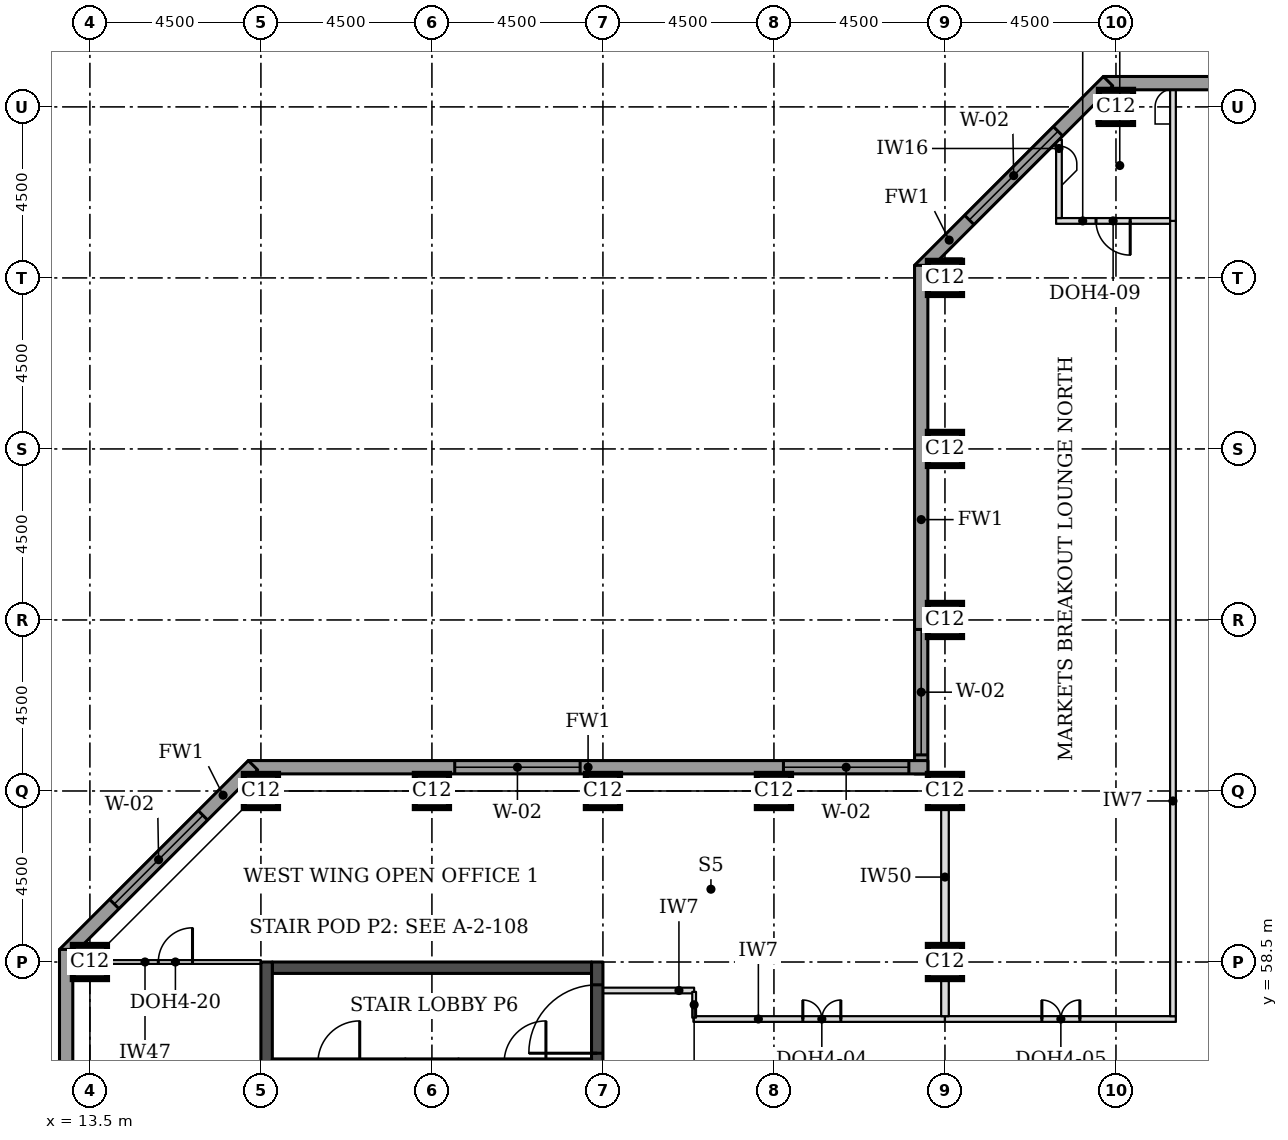
"""IFC4 building model, lengths in metres.
Left out: names, types, materials, properties, quantities, classifications, styles, units other than length and angle.
Written with IfcOpenShell. Run it as: python <this file> out.ifc"""

import sys

from ifc_helpers import new_model, si_unit, direction, frame, frame_2d, origin, origin_2d, place, context, subcontext, project, spatial, rectangle, extrude, element, fill, save


model = new_model("IFC4")
c1 = context("Model", 3, precision=1e-05, world=origin(), true_north=direction((0.0, 1.0)))
c2 = subcontext(c1, "Body", "Model", "MODEL_VIEW")
j1 = project(units=[si_unit("LENGTHUNIT", "METRE"), si_unit("PLANEANGLEUNIT", "RADIAN")], contexts=[c1])
p1 = place(None, origin())
s1 = spatial("IfcSite", under=j1, at=p1, CompositionType="ELEMENT")
p2 = place(p1, origin())
s2 = spatial("IfcBuilding", under=s1, at=p2, CompositionType="ELEMENT")
p3 = place(p2, frame((0.0, 0.0, 169.9)))
s3 = spatial("IfcBuildingStorey", under=s2, at=p3, CompositionType="ELEMENT", Elevation=169.9)
for number, where, z_axis, x_axis in (
    (1, (13.5, 58.5, 0.0), (0.0, 0.0, 1.0), (1.0, 0.0, 0.0)),
    (2, (36.0, 58.5, 0.0), (0.0, 0.0, 1.0), (1.0, 0.0, 0.0)),
    (3, (18.0, 63.0, 0.0), (0.0, 0.0, 1.0), (1.0, 0.0, 0.0)),
    (4, (22.5, 63.0, 0.0), (0.0, 0.0, 1.0), (1.0, 0.0, 0.0)),
    (5, (27.0, 63.0, 0.0), (0.0, 0.0, 1.0), (1.0, 0.0, 0.0)),
    (6, (31.5, 63.0, 0.0), (0.0, 0.0, 1.0), (1.0, 0.0, 0.0)),
    (7, (36.0, 63.0, 0.0), (0.0, 0.0, 1.0), (1.0, 0.0, 0.0)),
    (8, (36.0, 67.5, 0.0), (0.0, 0.0, 1.0), (1.0, 0.0, 0.0)),
    (9, (36.0, 72.0, 0.0), (0.0, 0.0, 1.0), (1.0, 0.0, 0.0)),
    (10, (36.0, 76.5, 0.0), (0.0, 0.0, 1.0), (1.0, 0.0, 0.0)),
    (11, (40.5, 81.0, 0.0), (0.0, 0.0, 1.0), (1.0, 0.0, 0.0)),
):
    element("IfcColumn", number, at=place(p3, frame(where, z_axis=z_axis, x_axis=x_axis)), inside=s3, PredefinedType="COLUMN", context=c2, shape_type="SweptSolid", body=[
        extrude(rectangle(XDim=0.9, YDim=0.9, at=origin_2d()), origin(), (0.0, 0.0, 1.0), 3.7),
    ])
p4 = place(p3, frame((18.3, 58.35, 0.0), z_axis=(0.0, 0.0, 1.0), x_axis=(1.0, 0.0, 0.0)))
e12 = element("IfcWall", 12, at=p4, inside=s3, PredefinedType="SHEAR", context=c2, shape_type="SweptSolid", body=[
    extrude(rectangle(XDim=8.4, YDim=0.3, at=frame_2d((4.2, 0.0))), origin(), (0.0, 0.0, 1.0), 3.7),
])
p5 = place(p3, frame((18.15, 49.5, 0.0), z_axis=(0.0, 0.0, 1.0), x_axis=(0.0, 1.0, 0.0)))
e13 = element("IfcWall", 13, at=p5, inside=s3, PredefinedType="SHEAR", context=c2, shape_type="SweptSolid", body=[
    extrude(rectangle(XDim=9.0, YDim=0.3, at=frame_2d((4.5, 0.0))), origin(), (0.0, 0.0, 1.0), 3.7),
])
p6 = place(p3, frame((26.85, 49.5, 0.0), z_axis=(0.0, 0.0, 1.0), x_axis=(0.0, 1.0, 0.0)))
e14 = element("IfcWall", 14, at=p6, inside=s3, PredefinedType="SHEAR", context=c2, shape_type="SweptSolid", body=[
    extrude(rectangle(XDim=9.0, YDim=0.3, at=frame_2d((4.5, 0.0))), origin(), (0.0, 0.0, 1.0), 3.7),
])
p7 = place(p6, frame((6.6, 0.0, 0.0)))
e15 = element("IfcOpeningElement", 15, at=p7, cuts=e14, PredefinedType="OPENING", context=c2, shape_type="SweptSolid", body=[
    extrude(rectangle(XDim=1.8, YDim=2.1, at=frame_2d((0.9, 1.05))), frame((0.0, 0.16, 0.0), z_axis=(0.0, -1.0, 0.0), x_axis=(1.0, 0.0, 0.0)), (0.0, 0.0, 1.0), 0.32),
])
p8 = place(p3, frame((72.331, 81.625, 0.0), z_axis=(0.0, 0.0, 1.0), x_axis=(-1.0, 0.0, 0.0)))
e16 = element("IfcWall", 16, at=p8, inside=s3, PredefinedType="STANDARD", context=c2, shape_type="SweptSolid", body=[
    extrude(rectangle(XDim=32.163, YDim=0.35, at=frame_2d((16.081, 0.0))), origin(), (0.0, 0.0, 1.0), 3.525),
])
p9 = place(p8, frame((5.431, 0.0, 0.9)))
e17 = element("IfcOpeningElement", 17, at=p9, cuts=e16, PredefinedType="OPENING", context=c2, shape_type="SweptSolid", body=[
    extrude(rectangle(XDim=3.3, YDim=1.9, at=frame_2d((1.65, 0.95))), frame((0.0, 0.185, 0.0), z_axis=(0.0, -1.0, 0.0), x_axis=(1.0, 0.0, 0.0)), (0.0, 0.0, 1.0), 0.37),
])
p10 = place(p8, frame((9.931, 0.0, 0.9)))
e18 = element("IfcOpeningElement", 18, at=p10, cuts=e16, PredefinedType="OPENING", context=c2, shape_type="SweptSolid", body=[
    extrude(rectangle(XDim=3.3, YDim=1.9, at=frame_2d((1.65, 0.95))), frame((0.0, 0.185, 0.0), z_axis=(0.0, -1.0, 0.0), x_axis=(1.0, 0.0, 0.0)), (0.0, 0.0, 1.0), 0.37),
])
p11 = place(p8, frame((14.431, 0.0, 0.9)))
e19 = element("IfcOpeningElement", 19, at=p11, cuts=e16, PredefinedType="OPENING", context=c2, shape_type="SweptSolid", body=[
    extrude(rectangle(XDim=3.3, YDim=1.9, at=frame_2d((1.65, 0.95))), frame((0.0, 0.185, 0.0), z_axis=(0.0, -1.0, 0.0), x_axis=(1.0, 0.0, 0.0)), (0.0, 0.0, 1.0), 0.37),
])
p12 = place(p8, frame((18.931, 0.0, 0.9)))
e20 = element("IfcOpeningElement", 20, at=p12, cuts=e16, PredefinedType="OPENING", context=c2, shape_type="SweptSolid", body=[
    extrude(rectangle(XDim=3.3, YDim=1.9, at=frame_2d((1.65, 0.95))), frame((0.0, 0.185, 0.0), z_axis=(0.0, -1.0, 0.0), x_axis=(1.0, 0.0, 0.0)), (0.0, 0.0, 1.0), 0.37),
])
p13 = place(p8, frame((23.431, 0.0, 0.9)))
e21 = element("IfcOpeningElement", 21, at=p13, cuts=e16, PredefinedType="OPENING", context=c2, shape_type="SweptSolid", body=[
    extrude(rectangle(XDim=3.3, YDim=1.9, at=frame_2d((1.65, 0.95))), frame((0.0, 0.185, 0.0), z_axis=(0.0, -1.0, 0.0), x_axis=(1.0, 0.0, 0.0)), (0.0, 0.0, 1.0), 0.37),
])
p14 = place(p3, frame((40.292, 81.676, 0.0), z_axis=(0.0, 0.0, 1.0), x_axis=(-0.707106781187, -0.707106781187, 0.0)))
e22 = element("IfcWall", 22, at=p14, inside=s3, PredefinedType="STANDARD", context=c2, shape_type="SweptSolid", body=[
    extrude(rectangle(XDim=7.027, YDim=0.35, at=frame_2d((3.513, 0.0))), origin(), (0.0, 0.0, 1.0), 3.525),
])
p15 = place(p14, frame((1.863, 0.0, 0.9)))
e23 = element("IfcOpeningElement", 23, at=p15, cuts=e22, PredefinedType="OPENING", context=c2, shape_type="SweptSolid", body=[
    extrude(rectangle(XDim=3.3, YDim=1.9, at=frame_2d((1.65, 0.95))), frame((0.0, 0.185, 0.0), z_axis=(0.0, -1.0, 0.0), x_axis=(1.0, 0.0, 0.0)), (0.0, 0.0, 1.0), 0.37),
])
p16 = place(p3, frame((35.375, 76.831, 0.0), z_axis=(0.0, 0.0, 1.0), x_axis=(0.0, -1.0, 0.0)))
e24 = element("IfcWall", 24, at=p16, inside=s3, PredefinedType="STANDARD", context=c2, shape_type="SweptSolid", body=[
    extrude(rectangle(XDim=13.381, YDim=0.35, at=frame_2d((6.691, 0.0))), origin(), (0.0, 0.0, 1.0), 3.525),
])
p17 = place(p16, frame((9.581, 0.0, 0.9)))
e25 = element("IfcOpeningElement", 25, at=p17, cuts=e24, PredefinedType="OPENING", context=c2, shape_type="SweptSolid", body=[
    extrude(rectangle(XDim=3.3, YDim=1.9, at=frame_2d((1.65, 0.95))), frame((0.0, 0.185, 0.0), z_axis=(0.0, -1.0, 0.0), x_axis=(1.0, 0.0, 0.0)), (0.0, 0.0, 1.0), 0.37),
])
p18 = place(p3, frame((35.55, 63.625, 0.0), z_axis=(0.0, 0.0, 1.0), x_axis=(-1.0, 0.0, 0.0)))
e26 = element("IfcWall", 26, at=p18, inside=s3, PredefinedType="STANDARD", context=c2, shape_type="SweptSolid", body=[
    extrude(rectangle(XDim=17.881, YDim=0.35, at=frame_2d((8.941, 0.0))), origin(), (0.0, 0.0, 1.0), 3.525),
])
p19 = place(p18, frame((0.5, 0.0, 0.9)))
e27 = element("IfcOpeningElement", 27, at=p19, cuts=e26, PredefinedType="OPENING", context=c2, shape_type="SweptSolid", body=[
    extrude(rectangle(XDim=3.3, YDim=1.9, at=frame_2d((1.65, 0.95))), frame((0.0, 0.185, 0.0), z_axis=(0.0, -1.0, 0.0), x_axis=(1.0, 0.0, 0.0)), (0.0, 0.0, 1.0), 0.37),
])
p20 = place(p18, frame((9.15, 0.0, 0.9)))
e28 = element("IfcOpeningElement", 28, at=p20, cuts=e26, PredefinedType="OPENING", context=c2, shape_type="SweptSolid", body=[
    extrude(rectangle(XDim=3.3, YDim=1.9, at=frame_2d((1.65, 0.95))), frame((0.0, 0.185, 0.0), z_axis=(0.0, -1.0, 0.0), x_axis=(1.0, 0.0, 0.0)), (0.0, 0.0, 1.0), 0.37),
])
p21 = place(p3, frame((17.792, 63.676, 0.0), z_axis=(0.0, 0.0, 1.0), x_axis=(-0.707106781187, -0.707106781187, 0.0)))
e29 = element("IfcWall", 29, at=p21, inside=s3, PredefinedType="STANDARD", context=c2, shape_type="SweptSolid", body=[
    extrude(rectangle(XDim=7.027, YDim=0.35, at=frame_2d((3.513, 0.0))), origin(), (0.0, 0.0, 1.0), 3.525),
])
p22 = place(p21, frame((1.863, 0.0, 0.9)))
e30 = element("IfcOpeningElement", 30, at=p22, cuts=e29, PredefinedType="OPENING", context=c2, shape_type="SweptSolid", body=[
    extrude(rectangle(XDim=3.3, YDim=1.9, at=frame_2d((1.65, 0.95))), frame((0.0, 0.185, 0.0), z_axis=(0.0, -1.0, 0.0), x_axis=(1.0, 0.0, 0.0)), (0.0, 0.0, 1.0), 0.37),
])
p23 = place(p3, frame((12.875, 58.831, 0.0), z_axis=(0.0, 0.0, 1.0), x_axis=(0.0, -1.0, 0.0)))
e31 = element("IfcWall", 31, at=p23, inside=s3, PredefinedType="STANDARD", context=c2, shape_type="SweptSolid", body=[
    extrude(rectangle(XDim=14.163, YDim=0.35, at=frame_2d((7.081, 0.0))), origin(), (0.0, 0.0, 1.0), 3.525),
])
p24 = place(p23, frame((5.431, 0.0, 0.9)))
e32 = element("IfcOpeningElement", 32, at=p24, cuts=e31, PredefinedType="OPENING", context=c2, shape_type="SweptSolid", body=[
    extrude(rectangle(XDim=3.3, YDim=1.9, at=frame_2d((1.65, 0.95))), frame((0.0, 0.185, 0.0), z_axis=(0.0, -1.0, 0.0), x_axis=(1.0, 0.0, 0.0)), (0.0, 0.0, 1.0), 0.37),
])
p25 = place(p3, frame((29.38, 57.0, 0.0), z_axis=(0.0, 0.0, 1.0), x_axis=(1.0, 0.0, 0.0)))
e33 = element("IfcWall", 33, at=p25, inside=s3, PredefinedType="PARTITIONING", context=c2, shape_type="SweptSolid", body=[
    extrude(rectangle(XDim=6.62, YDim=0.15, at=frame_2d((3.31, 0.0))), origin(), (0.0, 0.0, 1.0), 3.55),
])
p26 = place(p25, frame((2.88, 0.0, 0.0)))
e34 = element("IfcOpeningElement", 34, at=p26, cuts=e33, PredefinedType="OPENING", context=c2, shape_type="SweptSolid", body=[
    extrude(rectangle(XDim=1.0, YDim=2.1, at=frame_2d((0.5, 1.05))), frame((0.0, 0.085, 0.0), z_axis=(0.0, -1.0, 0.0), x_axis=(1.0, 0.0, 0.0)), (0.0, 0.0, 1.0), 0.17),
])
p27 = place(p3, frame((36.0, 57.0, 0.0), z_axis=(0.0, 0.0, 1.0), x_axis=(1.0, 0.0, 0.0)))
e35 = element("IfcWall", 35, at=p27, inside=s3, PredefinedType="PARTITIONING", context=c2, shape_type="SweptSolid", body=[
    extrude(rectangle(XDim=6.075, YDim=0.15, at=frame_2d((3.038, 0.0))), origin(), (0.0, 0.0, 1.0), 3.55),
])
p28 = place(p27, frame((2.55, 0.0, 0.0)))
e36 = element("IfcOpeningElement", 36, at=p28, cuts=e35, PredefinedType="OPENING", context=c2, shape_type="SweptSolid", body=[
    extrude(rectangle(XDim=1.0, YDim=2.1, at=frame_2d((0.5, 1.05))), frame((0.0, 0.085, 0.0), z_axis=(0.0, -1.0, 0.0), x_axis=(1.0, 0.0, 0.0)), (0.0, 0.0, 1.0), 0.17),
])
p29 = place(p3, frame((38.925, 78.0, 0.0), z_axis=(0.0, 0.0, 1.0), x_axis=(1.0, 0.0, 0.0)))
e37 = element("IfcWall", 37, at=p29, inside=s3, PredefinedType="PARTITIONING", context=c2, shape_type="SweptSolid", body=[
    extrude(rectangle(XDim=3.0, YDim=0.15, at=frame_2d((1.5, 0.0))), origin(), (0.0, 0.0, 1.0), 3.55),
])
p30 = place(p29, frame((1.05, 0.0, 0.0)))
e38 = element("IfcOpeningElement", 38, at=p30, cuts=e37, PredefinedType="OPENING", context=c2, shape_type="SweptSolid", body=[
    extrude(rectangle(XDim=0.9, YDim=2.1, at=frame_2d((0.45, 1.05))), frame((0.0, 0.085, 0.0), z_axis=(0.0, -1.0, 0.0), x_axis=(1.0, 0.0, 0.0)), (0.0, 0.0, 1.0), 0.17),
])
p31 = place(p3, frame((36.0, 57.075, 0.0), z_axis=(0.0, 0.0, 1.0), x_axis=(0.0, 1.0, 0.0)))
e39 = element("IfcWall", 39, at=p31, inside=s3, PredefinedType="PARTITIONING", context=c2, shape_type="SweptSolid", body=[
    extrude(rectangle(XDim=0.975, YDim=0.2, at=frame_2d((0.488, 0.0))), origin(), (0.0, 0.0, 1.0), 2.8),
])
p32 = place(p3, frame((42.0, 57.075, 0.0), z_axis=(0.0, 0.0, 1.0), x_axis=(0.0, 1.0, 0.0)))
e40 = element("IfcWall", 40, at=p32, inside=s3, PredefinedType="PARTITIONING", context=c2, shape_type="SweptSolid", body=[
    extrude(rectangle(XDim=20.925, YDim=0.15, at=frame_2d((10.462, 0.0))), origin(), (0.0, 0.0, 1.0), 3.55),
])
p33 = place(p3, frame((36.0, 58.92, 0.0), z_axis=(0.0, 0.0, 1.0), x_axis=(0.0, 1.0, 0.0)))
e41 = element("IfcWall", 41, at=p33, inside=s3, PredefinedType="PARTITIONING", context=c2, shape_type="SweptSolid", body=[
    extrude(rectangle(XDim=3.63, YDim=0.2, at=frame_2d((1.815, 0.0))), origin(), (0.0, 0.0, 1.0), 2.8),
])
p34 = place(p3, frame((42.0, 78.0, 0.0), z_axis=(0.0, 0.0, 1.0), x_axis=(0.0, 1.0, 0.0)))
e42 = element("IfcWall", 42, at=p34, inside=s3, PredefinedType="PARTITIONING", context=c2, shape_type="SweptSolid", body=[
    extrude(rectangle(XDim=3.45, YDim=0.15, at=frame_2d((1.725, 0.0))), origin(), (0.0, 0.0, 1.0), 3.55),
])
p35 = place(p3, frame((39.0, 78.075, 0.0), z_axis=(0.0, 0.0, 1.0), x_axis=(0.0, 1.0, 0.0)))
e43 = element("IfcWall", 43, at=p35, inside=s3, PredefinedType="PARTITIONING", context=c2, shape_type="SweptSolid", body=[
    extrude(rectangle(XDim=2.062, YDim=0.15, at=frame_2d((1.031, 0.0))), origin(), (0.0, 0.0, 1.0), 3.55),
])
p36 = place(p3, frame((13.5, 58.5, 0.0), z_axis=(0.0, 0.0, 1.0), x_axis=(1.0, 0.0, 0.0)))
e44 = element("IfcWall", 44, at=p36, inside=s3, PredefinedType="PARTITIONING", context=c2, shape_type="SweptSolid", body=[
    extrude(rectangle(XDim=4.5, YDim=0.1, at=frame_2d((2.25, 0.0))), origin(), (0.0, 0.0, 1.0), 2.55),
])
p37 = place(p36, frame((1.8, 0.0, 0.0)))
e45 = element("IfcOpeningElement", 45, at=p37, cuts=e44, PredefinedType="OPENING", context=c2, shape_type="SweptSolid", body=[
    extrude(rectangle(XDim=0.9, YDim=2.1, at=frame_2d((0.45, 1.05))), frame((0.0, 0.06, 0.0), z_axis=(0.0, -1.0, 0.0), x_axis=(1.0, 0.0, 0.0)), (0.0, 0.0, 1.0), 0.12),
])
p38 = place(p3, frame((27.0, 57.75, 0.0), z_axis=(0.0, 0.0, 1.0), x_axis=(1.0, 0.0, 0.0)))
e46 = element("IfcWall", 46, at=p38, inside=s3, PredefinedType="PARTITIONING", context=c2, shape_type="SweptSolid", body=[
    extrude(rectangle(XDim=2.4, YDim=0.15, at=frame_2d((1.2, 0.0))), origin(), (0.0, 0.0, 1.0), 3.55),
])
p39 = place(p3, frame((29.4, 57.715, 0.0), z_axis=(0.0, 0.0, 1.0), x_axis=(0.0, -1.0, 0.0)))
e47 = element("IfcWall", 47, at=p39, inside=s3, PredefinedType="PARTITIONING", context=c2, shape_type="SweptSolid", body=[
    extrude(rectangle(XDim=0.68, YDim=0.1, at=frame_2d((0.34, 0.0))), origin(), (0.0, 0.0, 1.0), 3.55),
])
p40 = place(p3, frame((21.8, 55.85, 0.0), z_axis=(0.0, 0.0, 1.0), x_axis=(1.0, 0.0, 0.0)))
e48 = element("IfcWall", 48, at=p40, inside=s3, PredefinedType="SOLIDWALL", context=c2, shape_type="SweptSolid", body=[
    extrude(rectangle(XDim=1.4, YDim=0.2, at=frame_2d((0.7, 0.0))), origin(), (0.0, 0.0, 1.0), 3.55),
])
p41 = place(p3, frame((18.3, 55.85, 0.0), z_axis=(0.0, 0.0, 1.0), x_axis=(1.0, 0.0, 0.0)))
e49 = element("IfcWall", 49, at=p41, inside=s3, PredefinedType="SOLIDWALL", context=c2, shape_type="SweptSolid", body=[
    extrude(rectangle(XDim=3.5, YDim=0.2, at=frame_2d((1.75, 0.0))), origin(), (0.0, 0.0, 1.0), 3.55),
])
p42 = place(p41, frame((1.2, 0.0, 0.0)))
e50 = element("IfcOpeningElement", 50, at=p42, cuts=e49, PredefinedType="OPENING", context=c2, shape_type="SweptSolid", body=[
    extrude(rectangle(XDim=1.1, YDim=2.1, at=frame_2d((0.55, 1.05))), frame((0.0, 0.11, 0.0), z_axis=(0.0, -1.0, 0.0), x_axis=(1.0, 0.0, 0.0)), (0.0, 0.0, 1.0), 0.22),
])
p43 = place(p3, frame((23.2, 55.85, 0.0), z_axis=(0.0, 0.0, 1.0), x_axis=(1.0, 0.0, 0.0)))
e51 = element("IfcWall", 51, at=p43, inside=s3, PredefinedType="SOLIDWALL", context=c2, shape_type="SweptSolid", body=[
    extrude(rectangle(XDim=3.5, YDim=0.2, at=frame_2d((1.75, 0.0))), origin(), (0.0, 0.0, 1.0), 3.55),
])
p44 = place(p43, frame((1.2, 0.0, 0.0)))
e52 = element("IfcOpeningElement", 52, at=p44, cuts=e51, PredefinedType="OPENING", context=c2, shape_type="SweptSolid", body=[
    extrude(rectangle(XDim=1.1, YDim=2.1, at=frame_2d((0.55, 1.05))), frame((0.0, 0.11, 0.0), z_axis=(0.0, -1.0, 0.0), x_axis=(1.0, 0.0, 0.0)), (0.0, 0.0, 1.0), 0.22),
])
p45 = place(p15, origin())
e53 = element("IfcWindow", 53, at=p45, inside=s3, PartitioningType="SINGLE_PANEL", PredefinedType="WINDOW", context=c2, shape_type="SweptSolid", body=[
    extrude(rectangle(XDim=3.3, YDim=1.9, at=frame_2d((1.65, 0.95))), frame((0.0, 0.085, 0.0), z_axis=(0.0, -1.0, 0.0), x_axis=(1.0, 0.0, 0.0)), (0.0, 0.0, 1.0), 0.06),
])
fill(e23, e53)
p46 = place(p17, origin())
e54 = element("IfcWindow", 54, at=p46, inside=s3, PartitioningType="SINGLE_PANEL", PredefinedType="WINDOW", context=c2, shape_type="SweptSolid", body=[
    extrude(rectangle(XDim=3.3, YDim=1.9, at=frame_2d((1.65, 0.95))), frame((0.0, 0.085, 0.0), z_axis=(0.0, -1.0, 0.0), x_axis=(1.0, 0.0, 0.0)), (0.0, 0.0, 1.0), 0.06),
])
fill(e25, e54)
p47 = place(p19, origin())
e55 = element("IfcWindow", 55, at=p47, inside=s3, PartitioningType="SINGLE_PANEL", PredefinedType="WINDOW", context=c2, shape_type="SweptSolid", body=[
    extrude(rectangle(XDim=3.3, YDim=1.9, at=frame_2d((1.65, 0.95))), frame((0.0, 0.085, 0.0), z_axis=(0.0, -1.0, 0.0), x_axis=(1.0, 0.0, 0.0)), (0.0, 0.0, 1.0), 0.06),
])
fill(e27, e55)
p48 = place(p20, origin())
e56 = element("IfcWindow", 56, at=p48, inside=s3, PartitioningType="SINGLE_PANEL", PredefinedType="WINDOW", context=c2, shape_type="SweptSolid", body=[
    extrude(rectangle(XDim=3.3, YDim=1.9, at=frame_2d((1.65, 0.95))), frame((0.0, 0.085, 0.0), z_axis=(0.0, -1.0, 0.0), x_axis=(1.0, 0.0, 0.0)), (0.0, 0.0, 1.0), 0.06),
])
fill(e28, e56)
p49 = place(p22, origin())
e57 = element("IfcWindow", 57, at=p49, inside=s3, PartitioningType="SINGLE_PANEL", PredefinedType="WINDOW", context=c2, shape_type="SweptSolid", body=[
    extrude(rectangle(XDim=3.3, YDim=1.9, at=frame_2d((1.65, 0.95))), frame((0.0, 0.085, 0.0), z_axis=(0.0, -1.0, 0.0), x_axis=(1.0, 0.0, 0.0)), (0.0, 0.0, 1.0), 0.06),
])
fill(e30, e57)
p50 = place(p28, origin())
e58 = element("IfcDoor", 58, at=p50, inside=s3, OperationType="DOUBLE_DOOR_SINGLE_SWING", PredefinedType="DOOR", context=c2, shape_type="SweptSolid", body=[
    extrude(rectangle(XDim=1.0, YDim=2.1, at=frame_2d((0.5, 1.05))), frame((0.0, 0.025, 0.0), z_axis=(0.0, -1.0, 0.0), x_axis=(1.0, 0.0, 0.0)), (0.0, 0.0, 1.0), 0.05),
])
fill(e36, e58)
p51 = place(p30, frame((0.9, 0.0, 0.0), z_axis=(0.0, 0.0, 1.0), x_axis=(-1.0, 0.0, 0.0)))
e59 = element("IfcDoor", 59, at=p51, inside=s3, OperationType="SINGLE_SWING_LEFT", PredefinedType="DOOR", context=c2, shape_type="SweptSolid", body=[
    extrude(rectangle(XDim=0.9, YDim=2.1, at=frame_2d((0.45, 1.05))), frame((0.0, 0.025, 0.0), z_axis=(0.0, -1.0, 0.0), x_axis=(1.0, 0.0, 0.0)), (0.0, 0.0, 1.0), 0.05),
])
fill(e38, e59)
p52 = place(p26, origin())
e60 = element("IfcDoor", 60, at=p52, inside=s3, OperationType="DOUBLE_DOOR_SINGLE_SWING", PredefinedType="DOOR", context=c2, shape_type="SweptSolid", body=[
    extrude(rectangle(XDim=1.0, YDim=2.1, at=frame_2d((0.5, 1.05))), frame((0.0, 0.025, 0.0), z_axis=(0.0, -1.0, 0.0), x_axis=(1.0, 0.0, 0.0)), (0.0, 0.0, 1.0), 0.05),
])
fill(e34, e60)
p53 = place(p37, origin())
e61 = element("IfcDoor", 61, at=p53, inside=s3, OperationType="SINGLE_SWING_RIGHT", PredefinedType="DOOR", context=c2, shape_type="SweptSolid", body=[
    extrude(rectangle(XDim=0.9, YDim=2.1, at=frame_2d((0.45, 1.05))), frame((0.0, 0.025, 0.0), z_axis=(0.0, -1.0, 0.0), x_axis=(1.0, 0.0, 0.0)), (0.0, 0.0, 1.0), 0.05),
])
fill(e45, e61)
p54 = place(p7, origin())
e62 = element("IfcDoor", 62, at=p54, inside=s3, OperationType="SINGLE_SWING_LEFT", PredefinedType="DOOR", context=c2, shape_type="SweptSolid", body=[
    extrude(rectangle(XDim=1.8, YDim=2.1, at=frame_2d((0.9, 1.05))), frame((0.0, 0.025, 0.0), z_axis=(0.0, -1.0, 0.0), x_axis=(1.0, 0.0, 0.0)), (0.0, 0.0, 1.0), 0.05),
])
fill(e15, e62)
save(model, sys.argv[1])
